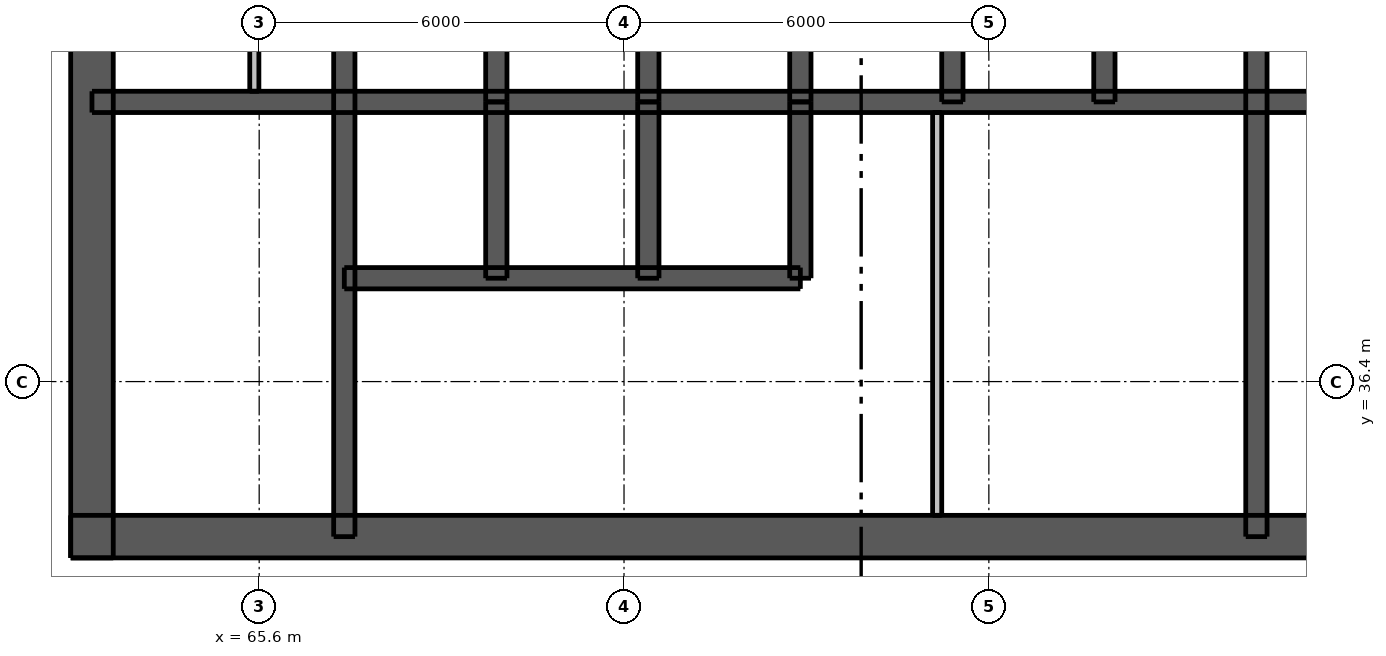
"""IFC4 building model, lengths in metres.
Left out: names, types, materials, properties, quantities, classifications, styles, units other than length and angle.
Written with IfcOpenShell. Run it as: python <this file> out.ifc"""

import sys

from ifc_helpers import new_model, si_unit, direction, frame, frame_2d, origin, place, context, subcontext, project, spatial, rectangle, extrude, element, fill, save


model = new_model("IFC4")
c1 = context("Model", 3, precision=1e-05, world=origin(), true_north=direction((0.0, 1.0)))
c2 = subcontext(c1, "Body", "Model", "MODEL_VIEW")
j1 = project(units=[si_unit("LENGTHUNIT", "METRE"), si_unit("PLANEANGLEUNIT", "RADIAN")], contexts=[c1])
p1 = place(None, origin())
s1 = spatial("IfcSite", under=j1, at=p1, CompositionType="ELEMENT")
p2 = place(p1, origin())
s2 = spatial("IfcBuilding", under=s1, at=p2, CompositionType="ELEMENT")
p3 = place(p2, frame((0.0, 0.0, 174.7)))
s3 = spatial("IfcBuildingStorey", under=s2, at=p3, CompositionType="ELEMENT", Elevation=174.7)
p4 = place(p3, frame((62.5, 33.85, 0.0), z_axis=(0.0, 0.0, 1.0), x_axis=(1.0, 0.0, 0.0)))
e1 = element("IfcWall", 1, at=p4, inside=s3, PredefinedType="SHEAR", context=c2, shape_type="SweptSolid", body=[
    extrude(rectangle(XDim=24.0, YDim=0.7, at=frame_2d((12.0, 0.0))), origin(), (0.0, 0.0, 1.0), 2.95),
])
p5 = place(p4, frame((1.962, 0.0, 0.0)))
e2 = element("IfcOpeningElement", 2, at=p5, cuts=e1, PredefinedType="OPENING", context=c2, shape_type="SweptSolid", body=[
    extrude(rectangle(XDim=1.1, YDim=2.1, at=frame_2d((0.55, 1.05))), frame((0.0, 0.36, 0.0), z_axis=(0.0, -1.0, 0.0), x_axis=(1.0, 0.0, 0.0)), (0.0, 0.0, 1.0), 0.72),
])
p6 = place(p4, frame((20.938, 0.0, 0.0)))
e3 = element("IfcOpeningElement", 3, at=p6, cuts=e1, PredefinedType="OPENING", context=c2, shape_type="SweptSolid", body=[
    extrude(rectangle(XDim=1.1, YDim=2.1, at=frame_2d((0.55, 1.05))), frame((0.0, 0.36, 0.0), z_axis=(0.0, -1.0, 0.0), x_axis=(1.0, 0.0, 0.0)), (0.0, 0.0, 1.0), 0.72),
])
p7 = place(p4, frame((8.0, 0.0, 0.0)))
e4 = element("IfcOpeningElement", 4, at=p7, cuts=e1, PredefinedType="OPENING", context=c2, shape_type="SweptSolid", body=[
    extrude(rectangle(XDim=1.1, YDim=2.1, at=frame_2d((0.55, 1.05))), frame((0.0, 0.36, 0.0), z_axis=(0.0, -1.0, 0.0), x_axis=(1.0, 0.0, 0.0)), (0.0, 0.0, 1.0), 0.72),
])
p8 = place(p4, frame((16.375, 0.0, 0.0)))
e5 = element("IfcOpeningElement", 5, at=p8, cuts=e1, PredefinedType="OPENING", context=c2, shape_type="SweptSolid", body=[
    extrude(rectangle(XDim=0.9, YDim=2.1, at=frame_2d((0.45, 1.05))), frame((0.0, 0.36, 0.0), z_axis=(0.0, -1.0, 0.0), x_axis=(1.0, 0.0, 0.0)), (0.0, 0.0, 1.0), 0.72),
])
p9 = place(p3, frame((62.85, 33.5, 0.0), z_axis=(0.0, 0.0, 1.0), x_axis=(0.0, 1.0, 0.0)))
e6 = element("IfcWall", 6, at=p9, inside=s3, PredefinedType="SHEAR", context=c2, shape_type="SweptSolid", body=[
    extrude(rectangle(XDim=24.0, YDim=0.7, at=frame_2d((12.0, 0.0))), origin(), (0.0, 0.0, 1.0), 2.95),
])
p10 = place(p9, frame((11.2, 0.0, 0.0)))
e7 = element("IfcOpeningElement", 7, at=p10, cuts=e6, PredefinedType="OPENING", context=c2, shape_type="SweptSolid", body=[
    extrude(rectangle(XDim=1.6, YDim=2.1, at=frame_2d((0.8, 1.05))), frame((0.0, 0.36, 0.0), z_axis=(0.0, -1.0, 0.0), x_axis=(1.0, 0.0, 0.0)), (0.0, 0.0, 1.0), 0.72),
])
p11 = place(p3, frame((62.85, 41.0, 0.0), z_axis=(0.0, 0.0, 1.0), x_axis=(1.0, 0.0, 0.0)))
e8 = element("IfcWall", 8, at=p11, inside=s3, PredefinedType="SHEAR", context=c2, shape_type="SweptSolid", body=[
    extrude(rectangle(XDim=23.3, YDim=0.35, at=frame_2d((11.65, 0.0))), origin(), (0.0, 0.0, 1.0), 2.95),
])
p12 = place(p3, frame((67.0, 33.85, 0.0), z_axis=(0.0, 0.0, 1.0), x_axis=(0.0, 1.0, 0.0)))
e9 = element("IfcWall", 9, at=p12, inside=s3, PredefinedType="SHEAR", context=c2, shape_type="SweptSolid", body=[
    extrude(rectangle(XDim=10.05, YDim=0.35, at=frame_2d((5.025, 0.0))), origin(), (0.0, 0.0, 1.0), 2.95),
])
p13 = place(p12, frame((0.55, 0.0, 0.0)))
e10 = element("IfcOpeningElement", 10, at=p13, cuts=e9, PredefinedType="OPENING", context=c2, shape_type="SweptSolid", body=[
    extrude(rectangle(XDim=1.1, YDim=2.1, at=frame_2d((0.55, 1.05))), frame((0.0, 0.185, 0.0), z_axis=(0.0, -1.0, 0.0), x_axis=(1.0, 0.0, 0.0)), (0.0, 0.0, 1.0), 0.37),
])
p14 = place(p3, frame((82.0, 33.85, 0.0), z_axis=(0.0, 0.0, 1.0), x_axis=(0.0, 1.0, 0.0)))
e11 = element("IfcWall", 11, at=p14, inside=s3, PredefinedType="SHEAR", context=c2, shape_type="SweptSolid", body=[
    extrude(rectangle(XDim=10.05, YDim=0.35, at=frame_2d((5.025, 0.0))), origin(), (0.0, 0.0, 1.0), 2.95),
])
for number, where, z_axis, x_axis in (
    (12, (69.5, 41.0, 0.0), (0.0, 0.0, 1.0), (0.0, 1.0, 0.0)),
    (13, (72.0, 41.0, 0.0), (0.0, 0.0, 1.0), (0.0, 1.0, 0.0)),
    (14, (74.5, 41.0, 0.0), (0.0, 0.0, 1.0), (0.0, 1.0, 0.0)),
    (15, (77.0, 41.0, 0.0), (0.0, 0.0, 1.0), (0.0, 1.0, 0.0)),
    (16, (79.5, 41.0, 0.0), (0.0, 0.0, 1.0), (0.0, 1.0, 0.0)),
):
    element("IfcWall", number, at=place(p3, frame(where, z_axis=z_axis, x_axis=x_axis)), inside=s3, PredefinedType="SHEAR", context=c2, shape_type="SweptSolid", body=[
        extrude(rectangle(XDim=2.9, YDim=0.35, at=frame_2d((1.45, 0.0))), origin(), (0.0, 0.0, 1.0), 2.95),
    ])
p15 = place(p3, frame((67.0, 38.1, 0.0), z_axis=(0.0, 0.0, 1.0), x_axis=(1.0, 0.0, 0.0)))
e17 = element("IfcWall", 17, at=p15, inside=s3, PredefinedType="SHEAR", context=c2, shape_type="SweptSolid", body=[
    extrude(rectangle(XDim=7.5, YDim=0.35, at=frame_2d((3.75, 0.0))), origin(), (0.0, 0.0, 1.0), 2.95),
])
p16 = place(p15, frame((0.7, 0.0, 0.0)))
e18 = element("IfcOpeningElement", 18, at=p16, cuts=e17, PredefinedType="OPENING", context=c2, shape_type="SweptSolid", body=[
    extrude(rectangle(XDim=1.1, YDim=2.1, at=frame_2d((0.55, 1.05))), frame((0.0, 0.185, 0.0), z_axis=(0.0, -1.0, 0.0), x_axis=(1.0, 0.0, 0.0)), (0.0, 0.0, 1.0), 0.37),
])
p17 = place(p15, frame((3.2, 0.0, 0.0)))
e19 = element("IfcOpeningElement", 19, at=p17, cuts=e17, PredefinedType="OPENING", context=c2, shape_type="SweptSolid", body=[
    extrude(rectangle(XDim=1.1, YDim=2.1, at=frame_2d((0.55, 1.05))), frame((0.0, 0.185, 0.0), z_axis=(0.0, -1.0, 0.0), x_axis=(1.0, 0.0, 0.0)), (0.0, 0.0, 1.0), 0.37),
])
p18 = place(p15, frame((5.65, 0.0, 0.0)))
e20 = element("IfcOpeningElement", 20, at=p18, cuts=e17, PredefinedType="OPENING", context=c2, shape_type="SweptSolid", body=[
    extrude(rectangle(XDim=1.2, YDim=2.1, at=frame_2d((0.6, 1.05))), frame((0.0, 0.185, 0.0), z_axis=(0.0, -1.0, 0.0), x_axis=(1.0, 0.0, 0.0)), (0.0, 0.0, 1.0), 0.37),
])
for number, where, z_axis, x_axis in (
    (21, (69.5, 38.1, 0.0), (0.0, 0.0, 1.0), (0.0, 1.0, 0.0)),
    (22, (72.0, 38.1, 0.0), (0.0, 0.0, 1.0), (0.0, 1.0, 0.0)),
    (23, (74.5, 38.1, 0.0), (0.0, 0.0, 1.0), (0.0, 1.0, 0.0)),
):
    element("IfcWall", number, at=place(p3, frame(where, z_axis=z_axis, x_axis=x_axis)), inside=s3, PredefinedType="SHEAR", context=c2, shape_type="SweptSolid", body=[
        extrude(rectangle(XDim=2.9, YDim=0.35, at=frame_2d((1.45, 0.0))), origin(), (0.0, 0.0, 1.0), 2.95),
    ])
p19 = place(p3, frame((76.75, 34.2, 0.0), z_axis=(0.0, 0.0, 1.0), x_axis=(0.0, 1.0, 0.0)))
e24 = element("IfcWall", 24, at=p19, inside=s3, PredefinedType="PLUMBINGWALL", context=c2, shape_type="SweptSolid", body=[
    extrude(rectangle(XDim=6.625, YDim=0.15, at=frame_2d((3.312, 0.0))), origin(), (0.0, 0.0, 1.0), 2.95),
])
p20 = place(p3, frame((65.52, 41.175, 0.0), z_axis=(0.0, 0.0, 1.0), x_axis=(0.0, 1.0, 0.0)))
e25 = element("IfcWall", 25, at=p20, inside=s3, PredefinedType="PLUMBINGWALL", context=c2, shape_type="SweptSolid", body=[
    extrude(rectangle(XDim=2.55, YDim=0.15, at=frame_2d((1.275, 0.0))), origin(), (0.0, 0.0, 1.0), 2.95),
])
p21 = place(p5, origin())
e26 = element("IfcDoor", 26, at=p21, inside=s3, OperationType="SINGLE_SWING_LEFT", PredefinedType="DOOR", context=c2, shape_type="SweptSolid", body=[
    extrude(rectangle(XDim=1.1, YDim=2.1, at=frame_2d((0.55, 1.05))), frame((0.0, 0.337, 0.0), z_axis=(0.0, -1.0, 0.0), x_axis=(1.0, 0.0, 0.0)), (0.0, 0.0, 1.0), 0.05),
])
fill(e2, e26)
p22 = place(p7, origin())
e27 = element("IfcDoor", 27, at=p22, inside=s3, OperationType="SINGLE_SWING_LEFT", PredefinedType="DOOR", context=c2, shape_type="SweptSolid", body=[
    extrude(rectangle(XDim=1.1, YDim=2.1, at=frame_2d((0.55, 1.05))), frame((0.0, 0.337, 0.0), z_axis=(0.0, -1.0, 0.0), x_axis=(1.0, 0.0, 0.0)), (0.0, 0.0, 1.0), 0.05),
])
fill(e4, e27)
p23 = place(p13, origin())
e28 = element("IfcDoor", 28, at=p23, inside=s3, OperationType="SINGLE_SWING_RIGHT", PredefinedType="DOOR", context=c2, shape_type="SweptSolid", body=[
    extrude(rectangle(XDim=1.1, YDim=2.1, at=frame_2d((0.55, 1.05))), frame((0.0, -0.112, 0.0), z_axis=(0.0, -1.0, 0.0), x_axis=(1.0, 0.0, 0.0)), (0.0, 0.0, 1.0), 0.05),
])
fill(e10, e28)
p24 = place(p8, origin())
e29 = element("IfcDoor", 29, at=p24, inside=s3, OperationType="SINGLE_SWING_LEFT", PredefinedType="DOOR", context=c2, shape_type="SweptSolid", body=[
    extrude(rectangle(XDim=0.9, YDim=2.1, at=frame_2d((0.45, 1.05))), frame((0.0, 0.337, 0.0), z_axis=(0.0, -1.0, 0.0), x_axis=(1.0, 0.0, 0.0)), (0.0, 0.0, 1.0), 0.05),
])
fill(e5, e29)
p25 = place(p16, origin())
e30 = element("IfcDoor", 30, at=p25, inside=s3, OperationType="DOUBLE_DOOR_SLIDING", PredefinedType="DOOR", context=c2, shape_type="SweptSolid", body=[
    extrude(rectangle(XDim=1.1, YDim=2.1, at=frame_2d((0.55, 1.05))), frame((0.0, 0.025, 0.0), z_axis=(0.0, -1.0, 0.0), x_axis=(1.0, 0.0, 0.0)), (0.0, 0.0, 1.0), 0.05),
])
fill(e18, e30)
p26 = place(p17, origin())
e31 = element("IfcDoor", 31, at=p26, inside=s3, OperationType="DOUBLE_DOOR_SLIDING", PredefinedType="DOOR", context=c2, shape_type="SweptSolid", body=[
    extrude(rectangle(XDim=1.1, YDim=2.1, at=frame_2d((0.55, 1.05))), frame((0.0, 0.025, 0.0), z_axis=(0.0, -1.0, 0.0), x_axis=(1.0, 0.0, 0.0)), (0.0, 0.0, 1.0), 0.05),
])
fill(e19, e31)
p27 = place(p18, origin())
e32 = element("IfcDoor", 32, at=p27, inside=s3, OperationType="DOUBLE_DOOR_SLIDING", PredefinedType="DOOR", context=c2, shape_type="SweptSolid", body=[
    extrude(rectangle(XDim=1.2, YDim=2.1, at=frame_2d((0.6, 1.05))), frame((0.0, 0.025, 0.0), z_axis=(0.0, -1.0, 0.0), x_axis=(1.0, 0.0, 0.0)), (0.0, 0.0, 1.0), 0.05),
])
fill(e20, e32)
save(model, sys.argv[1])
